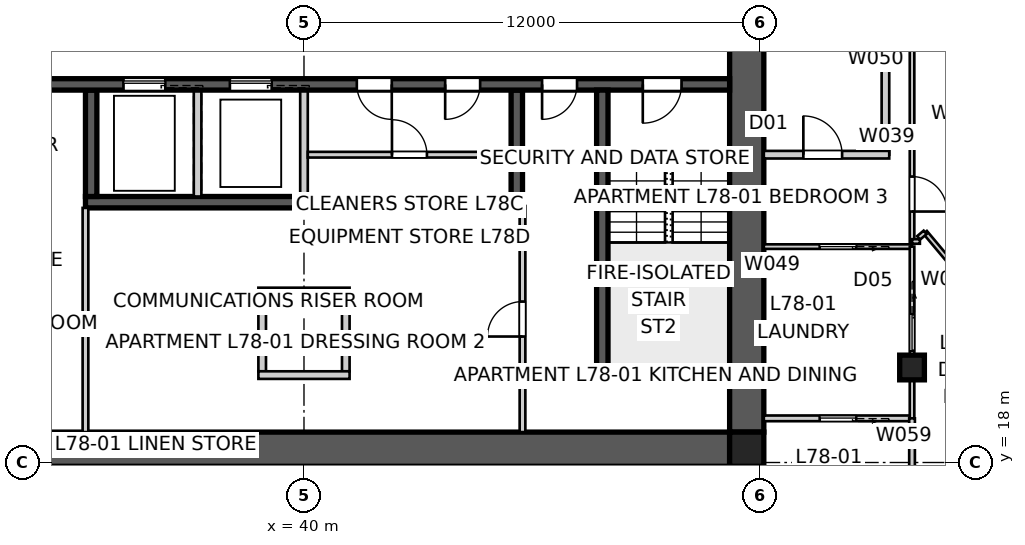
"""IFC4 building model, lengths in metres.
Left out: names, types, materials, properties, quantities, classifications, styles, units other than length and angle.
Written with IfcOpenShell. Run it as: python <this file> out.ifc"""

import sys

from ifc_helpers import new_model, si_unit, direction, frame, frame_2d, origin, origin_2d, place, context, subcontext, project, spatial, polyline, rectangle, outline, extrude, element, fill, save


model = new_model("IFC4")
c1 = context("Model", 3, precision=1e-05, world=origin(), true_north=direction((0.0, 1.0)))
c2 = subcontext(c1, "Body", "Model", "MODEL_VIEW")
j1 = project(units=[si_unit("LENGTHUNIT", "METRE"), si_unit("PLANEANGLEUNIT", "RADIAN")], contexts=[c1])
p1 = place(None, origin())
s1 = spatial("IfcSite", under=j1, at=p1, CompositionType="ELEMENT")
p2 = place(p1, origin())
s2 = spatial("IfcBuilding", under=s1, at=p2, CompositionType="ELEMENT")
p3 = place(p2, frame((0.0, 0.0, 282.8)))
s3 = spatial("IfcBuildingStorey", under=s2, at=p3, CompositionType="ELEMENT", Elevation=282.8)
p4 = place(p3, frame((51.2, 18.35, 0.0), z_axis=(0.0, 0.0, 1.0), x_axis=(-1.0, 0.0, 0.0)))
e1 = element("IfcWall", 1, at=p4, inside=s3, PredefinedType="SHEAR", context=c2, shape_type="SweptSolid", body=[
    extrude(outline(polyline([(0.0, -0.45), (22.4, -0.45), (22.4, -0.025), (22.85, -0.025), (22.85, 0.025), (22.4, 0.025), (22.4, 0.45), (0.0, 0.45), (0.0, 0.025), (-0.45, 0.025), (-0.45, -0.025), (0.0, -0.025), (0.0, -0.45)])), origin(), (0.0, 0.0, 1.0), 3.4),
])
p5 = place(p3, frame((51.65, 18.8, 0.0), z_axis=(0.0, 0.0, 1.0), x_axis=(0.0, 1.0, 0.0)))
e2 = element("IfcWall", 2, at=p5, inside=s3, PredefinedType="SHEAR", context=c2, shape_type="SweptSolid", body=[
    extrude(outline(polyline([(0.0, -0.45), (22.4, -0.45), (22.4, -0.025), (22.85, -0.025), (22.85, 0.025), (22.4, 0.025), (22.4, 0.45), (0.0, 0.45), (0.0, 0.025), (-0.45, 0.025), (-0.45, -0.025), (0.0, -0.025), (0.0, -0.45)])), origin(), (0.0, 0.0, 1.0), 3.4),
])
p6 = place(p5, frame((11.14, 0.0, 0.0)))
e3 = element("IfcOpeningElement", 3, at=p6, cuts=e2, PredefinedType="OPENING", context=c2, shape_type="SweptSolid", body=[
    extrude(rectangle(XDim=1.02, YDim=2.4, at=frame_2d((0.51, 1.2))), frame((0.0, 0.46, 0.0), z_axis=(0.0, -1.0, 0.0), x_axis=(1.0, 0.0, 0.0)), (0.0, 0.0, 1.0), 0.92),
])
p7 = place(p3, frame((51.2, 27.95, 0.0), z_axis=(0.0, 0.0, 1.0), x_axis=(-1.0, 0.0, 0.0)))
e4 = element("IfcWall", 4, at=p7, inside=s3, PredefinedType="SHEAR", context=c2, shape_type="SweptSolid", body=[
    extrude(rectangle(XDim=22.4, YDim=0.3, at=frame_2d((11.2, 0.0))), origin(), (0.0, 0.0, 1.0), 3.4),
])
p8 = place(p7, frame((19.04, 0.0, 0.0)))
e5 = element("IfcOpeningElement", 5, at=p8, cuts=e4, PredefinedType="OPENING", context=c2, shape_type="SweptSolid", body=[
    extrude(rectangle(XDim=0.92, YDim=2.1, at=frame_2d((0.46, 1.05))), frame((0.0, 0.16, 0.0), z_axis=(0.0, -1.0, 0.0), x_axis=(1.0, 0.0, 0.0)), (0.0, 0.0, 1.0), 0.32),
])
p9 = place(p7, frame((1.265, 0.0, 0.0)))
e6 = element("IfcOpeningElement", 6, at=p9, cuts=e4, PredefinedType="OPENING", context=c2, shape_type="SweptSolid", body=[
    extrude(rectangle(XDim=1.02, YDim=2.1, at=frame_2d((0.51, 1.05))), frame((0.0, 0.16, 0.0), z_axis=(0.0, -1.0, 0.0), x_axis=(1.0, 0.0, 0.0)), (0.0, 0.0, 1.0), 0.32),
])
p10 = place(p7, frame((4.015, 0.0, 0.0)))
e7 = element("IfcOpeningElement", 7, at=p10, cuts=e4, PredefinedType="OPENING", context=c2, shape_type="SweptSolid", body=[
    extrude(rectangle(XDim=0.92, YDim=2.1, at=frame_2d((0.46, 1.05))), frame((0.0, 0.16, 0.0), z_axis=(0.0, -1.0, 0.0), x_axis=(1.0, 0.0, 0.0)), (0.0, 0.0, 1.0), 0.32),
])
p11 = place(p7, frame((8.89, 0.0, 0.0)))
e8 = element("IfcOpeningElement", 8, at=p11, cuts=e4, PredefinedType="OPENING", context=c2, shape_type="SweptSolid", body=[
    extrude(rectangle(XDim=0.92, YDim=2.1, at=frame_2d((0.46, 1.05))), frame((0.0, 0.16, 0.0), z_axis=(0.0, -1.0, 0.0), x_axis=(1.0, 0.0, 0.0)), (0.0, 0.0, 1.0), 0.32),
])
p12 = place(p7, frame((6.565, 0.0, 0.0)))
e9 = element("IfcOpeningElement", 9, at=p12, cuts=e4, PredefinedType="OPENING", context=c2, shape_type="SweptSolid", body=[
    extrude(rectangle(XDim=0.92, YDim=2.1, at=frame_2d((0.46, 1.05))), frame((0.0, 0.16, 0.0), z_axis=(0.0, -1.0, 0.0), x_axis=(1.0, 0.0, 0.0)), (0.0, 0.0, 1.0), 0.32),
])
p13 = place(p7, frame((12.05, 0.0, 0.0)))
e10 = element("IfcOpeningElement", 10, at=p13, cuts=e4, PredefinedType="OPENING", context=c2, shape_type="SweptSolid", body=[
    extrude(rectangle(XDim=1.1, YDim=2.1, at=frame_2d((0.55, 1.05))), frame((0.0, 0.16, 0.0), z_axis=(0.0, -1.0, 0.0), x_axis=(1.0, 0.0, 0.0)), (0.0, 0.0, 1.0), 0.32),
])
p14 = place(p7, frame((14.85, 0.0, 0.0)))
e11 = element("IfcOpeningElement", 11, at=p14, cuts=e4, PredefinedType="OPENING", context=c2, shape_type="SweptSolid", body=[
    extrude(rectangle(XDim=1.1, YDim=2.1, at=frame_2d((0.55, 1.05))), frame((0.0, 0.16, 0.0), z_axis=(0.0, -1.0, 0.0), x_axis=(1.0, 0.0, 0.0)), (0.0, 0.0, 1.0), 0.32),
])
p15 = place(p3, frame((45.75, 24.85, 0.0), z_axis=(0.0, 0.0, 1.0), x_axis=(-1.0, 0.0, 0.0)))
e12 = element("IfcWall", 12, at=p15, inside=s3, PredefinedType="SHEAR", context=c2, shape_type="SweptSolid", body=[
    extrude(rectangle(XDim=11.5, YDim=0.3, at=frame_2d((5.75, 0.0))), origin(), (0.0, 0.0, 1.0), 3.4),
])
p16 = place(p3, frame((45.6, 27.8, 0.0), z_axis=(0.0, 0.0, 1.0), x_axis=(0.0, -1.0, 0.0)))
e13 = element("IfcWall", 13, at=p16, inside=s3, PredefinedType="SHEAR", context=c2, shape_type="SweptSolid", body=[
    extrude(rectangle(XDim=2.8, YDim=0.3, at=frame_2d((1.4, 0.0))), origin(), (0.0, 0.0, 1.0), 3.4),
])
for number, where, z_axis, x_axis in (
    (14, (40.0, 27.8, 0.0), (0.0, 0.0, 1.0), (0.0, -1.0, 0.0)),
    (15, (37.2, 27.8, 0.0), (0.0, 0.0, 1.0), (0.0, -1.0, 0.0)),
):
    element("IfcWall", number, at=place(p3, frame(where, z_axis=z_axis, x_axis=x_axis)), inside=s3, PredefinedType="SOLIDWALL", context=c2, shape_type="SweptSolid", body=[
        extrude(rectangle(XDim=2.8, YDim=0.2, at=frame_2d((1.4, 0.0))), origin(), (0.0, 0.0, 1.0), 3.4),
    ])
p17 = place(p3, frame((34.4, 27.8, 0.0), z_axis=(0.0, 0.0, 1.0), x_axis=(0.0, -1.0, 0.0)))
e16 = element("IfcWall", 16, at=p17, inside=s3, PredefinedType="SHEAR", context=c2, shape_type="SweptSolid", body=[
    extrude(rectangle(XDim=2.8, YDim=0.3, at=frame_2d((1.4, 0.0))), origin(), (0.0, 0.0, 1.0), 3.4),
])
p18 = place(p3, frame((47.85, 27.8, 0.0), z_axis=(0.0, 0.0, 1.0), x_axis=(0.0, -1.0, 0.0)))
e17 = element("IfcWall", 17, at=p18, inside=s3, PredefinedType="SHEAR", context=c2, shape_type="SweptSolid", body=[
    extrude(rectangle(XDim=7.7, YDim=0.3, at=frame_2d((3.85, 0.0))), origin(), (0.0, 0.0, 1.0), 3.4),
])
p19 = place(p3, frame((51.2, 20.25, 0.0), z_axis=(0.0, 0.0, 1.0), x_axis=(-1.0, 0.0, 0.0)))
e18 = element("IfcWall", 18, at=p19, inside=s3, PredefinedType="SHEAR", context=c2, shape_type="SweptSolid", body=[
    extrude(rectangle(XDim=3.5, YDim=0.3, at=frame_2d((1.75, 0.0))), origin(), (0.0, 0.0, 1.0), 3.4),
])
for number, where, z_axis, x_axis in (
    (19, (38.9, 22.4, 0.0), (0.0, 0.0, 1.0), (0.0, -1.0, 0.0)),
    (20, (41.1, 22.4, 0.0), (0.0, 0.0, 1.0), (0.0, -1.0, 0.0)),
):
    element("IfcWall", number, at=place(p3, frame(where, z_axis=z_axis, x_axis=x_axis)), inside=s3, PredefinedType="SOLIDWALL", context=c2, shape_type="SweptSolid", body=[
        extrude(rectangle(XDim=2.0, YDim=0.2, at=frame_2d((1.0, 0.0))), origin(), (0.0, 0.0, 1.0), 3.4),
    ])
for number, where, z_axis, x_axis in (
    (21, (38.8, 22.5, 0.0), (0.0, 0.0, 1.0), (1.0, 0.0, 0.0)),
    (22, (38.8, 20.3, 0.0), (0.0, 0.0, 1.0), (1.0, 0.0, 0.0)),
):
    element("IfcWall", number, at=place(p3, frame(where, z_axis=z_axis, x_axis=x_axis)), inside=s3, PredefinedType="SOLIDWALL", context=c2, shape_type="SweptSolid", body=[
        extrude(rectangle(XDim=2.4, YDim=0.2, at=frame_2d((1.2, 0.0))), origin(), (0.0, 0.0, 1.0), 3.4),
    ])
p20 = place(p3, frame((51.65, 18.35, 0.0), z_axis=(0.0, 0.0, 1.0), x_axis=(1.0, 0.0, 0.0)))
e23 = element("IfcColumn", 23, at=p20, inside=s3, PredefinedType="COLUMN", context=c2, shape_type="SweptSolid", body=[
    extrude(rectangle(XDim=0.9, YDim=0.9, at=origin_2d()), origin(), (0.0, 0.0, 1.0), 3.4),
])
p21 = place(p3, frame((56.0, 20.5, 0.0), z_axis=(0.0, 0.0, 1.0), x_axis=(1.0, 0.0, 0.0)))
e24 = element("IfcColumn", 24, at=p21, inside=s3, PredefinedType="COLUMN", context=c2, shape_type="SweptSolid", body=[
    extrude(rectangle(XDim=0.65, YDim=0.65, at=origin_2d()), origin(), (0.0, 0.0, 1.0), 3.4),
])
p22 = place(p3, frame((55.3, 26.1, 0.0), z_axis=(0.0, 0.0, 1.0), x_axis=(0.0, 1.0, 0.0)))
e25 = element("IfcWall", 25, at=p22, inside=s3, PredefinedType="PARTITIONING", context=c2, shape_type="SweptSolid", body=[
    extrude(rectangle(XDim=7.8, YDim=0.2, at=frame_2d((3.9, 0.0))), origin(), (0.0, 0.0, 1.0), 3.25),
])
p23 = place(p3, frame((52.1, 26.1, 0.0), z_axis=(0.0, 0.0, 1.0), x_axis=(1.0, 0.0, 0.0)))
e26 = element("IfcWall", 26, at=p23, inside=s3, PredefinedType="PARTITIONING", context=c2, shape_type="SweptSolid", body=[
    extrude(rectangle(XDim=3.3, YDim=0.2, at=frame_2d((1.65, 0.0))), origin(), (0.0, 0.0, 1.0), 3.25),
])
p24 = place(p23, frame((1.04, 0.0, 0.0)))
e27 = element("IfcOpeningElement", 27, at=p24, cuts=e26, PredefinedType="OPENING", context=c2, shape_type="SweptSolid", body=[
    extrude(rectangle(XDim=1.02, YDim=2.34, at=frame_2d((0.51, 1.17))), frame((0.0, 0.11, 0.0), z_axis=(0.0, -1.0, 0.0), x_axis=(1.0, 0.0, 0.0)), (0.0, 0.0, 1.0), 0.22),
])
p25 = place(p3, frame((45.75, 18.8, 0.0), z_axis=(0.0, 0.0, 1.0), x_axis=(0.0, 1.0, 0.0)))
e28 = element("IfcWall", 28, at=p25, inside=s3, PredefinedType="SOLIDWALL", context=c2, shape_type="SweptSolid", body=[
    extrude(rectangle(XDim=5.95, YDim=0.15, at=frame_2d((2.975, 0.0))), origin(), (0.0, 0.0, 1.0), 3.25),
])
p26 = place(p25, frame((2.515, 0.0, 0.0)))
e29 = element("IfcOpeningElement", 29, at=p26, cuts=e28, PredefinedType="OPENING", context=c2, shape_type="SweptSolid", body=[
    extrude(rectangle(XDim=0.92, YDim=2.1, at=frame_2d((0.46, 1.05))), frame((0.0, 0.085, 0.0), z_axis=(0.0, -1.0, 0.0), x_axis=(1.0, 0.0, 0.0)), (0.0, 0.0, 1.0), 0.17),
])
p27 = place(p3, frame((34.25, 18.8, 0.0), z_axis=(0.0, 0.0, 1.0), x_axis=(0.0, 1.0, 0.0)))
e30 = element("IfcWall", 30, at=p27, inside=s3, PredefinedType="SOLIDWALL", context=c2, shape_type="SweptSolid", body=[
    extrude(rectangle(XDim=5.9, YDim=0.15, at=frame_2d((2.95, 0.0))), origin(), (0.0, 0.0, 1.0), 3.25),
])
p28 = place(p3, frame((56.0, 23.681, 0.0), z_axis=(0.0, 0.0, 1.0), x_axis=(-1.0, 0.0, 0.0)))
e31 = element("IfcWall", 31, at=p28, inside=s3, PredefinedType="PARTITIONING", context=c2, shape_type="SweptSolid", body=[
    extrude(rectangle(XDim=3.9, YDim=0.12, at=frame_2d((1.95, 0.0))), origin(), (0.0, 0.0, 1.0), 3.25),
])
p29 = place(p28, frame((1.47, 0.0, 0.0)))
e32 = element("IfcOpeningElement", 32, at=p29, cuts=e31, PredefinedType="OPENING", context=c2, shape_type="SweptSolid", body=[
    extrude(rectangle(XDim=0.96, YDim=2.1, at=frame_2d((0.48, 1.05))), frame((0.0, 0.07, 0.0), z_axis=(0.0, -1.0, 0.0), x_axis=(1.0, 0.0, 0.0)), (0.0, 0.0, 1.0), 0.14),
])
p30 = place(p3, frame((56.0, 42.762, 0.0), z_axis=(0.0, 0.0, 1.0), x_axis=(0.0, -1.0, 0.0)))
e33 = element("IfcWall", 33, at=p30, inside=s3, PredefinedType="PARTITIONING", context=c2, shape_type="SweptSolid", body=[
    extrude(rectangle(XDim=18.995, YDim=0.12, at=frame_2d((9.498, 0.0))), origin(), (0.0, 0.0, 1.0), 2.549),
])
p31 = place(p30, frame((17.238, 0.0, 0.0)))
e34 = element("IfcOpeningElement", 34, at=p31, cuts=e33, PredefinedType="OPENING", context=c2, shape_type="SweptSolid", body=[
    extrude(rectangle(XDim=0.92, YDim=2.34, at=frame_2d((0.46, 1.17))), frame((0.0, 0.07, 0.0), z_axis=(0.0, -1.0, 0.0), x_axis=(1.0, 0.0, 0.0)), (0.0, 0.0, 1.0), 0.14),
])
p32 = place(p30, frame((6.017, 0.0, 0.0)))
e35 = element("IfcOpeningElement", 35, at=p32, cuts=e33, PredefinedType="OPENING", context=c2, shape_type="SweptSolid", body=[
    extrude(rectangle(XDim=0.92, YDim=2.34, at=frame_2d((0.46, 1.17))), frame((0.0, 0.07, 0.0), z_axis=(0.0, -1.0, 0.0), x_axis=(1.0, 0.0, 0.0)), (0.0, 0.0, 1.0), 0.14),
])
p33 = place(p3, frame((56.0, 19.162, 0.0), z_axis=(0.0, 0.0, 1.0), x_axis=(-1.0, 0.0, 0.0)))
e36 = element("IfcWall", 36, at=p33, inside=s3, PredefinedType="SOLIDWALL", context=c2, shape_type="SweptSolid", body=[
    extrude(rectangle(XDim=3.9, YDim=0.15, at=frame_2d((1.95, 0.0))), origin(), (0.0, 0.0, 1.0), 3.25),
])
p34 = place(p33, frame((1.47, 0.0, 0.0)))
e37 = element("IfcOpeningElement", 37, at=p34, cuts=e36, PredefinedType="OPENING", context=c2, shape_type="SweptSolid", body=[
    extrude(rectangle(XDim=0.96, YDim=2.1, at=frame_2d((0.48, 1.05))), frame((0.0, 0.085, 0.0), z_axis=(0.0, -1.0, 0.0), x_axis=(1.0, 0.0, 0.0)), (0.0, 0.0, 1.0), 0.17),
])
p35 = place(p3, frame((56.0, 23.681, 0.0), z_axis=(0.0, 0.0, 1.0), x_axis=(0.0, -1.0, 0.0)))
e38 = element("IfcWall", 38, at=p35, inside=s3, PredefinedType="PARTITIONING", context=c2, shape_type="SweptSolid", body=[
    extrude(rectangle(XDim=4.519, YDim=0.12, at=frame_2d((2.26, 0.0))), origin(), (0.0, 0.0, 1.0), 2.549),
])
p36 = place(p35, frame((1.78, 0.0, 0.0)))
e39 = element("IfcOpeningElement", 39, at=p36, cuts=e38, PredefinedType="OPENING", context=c2, shape_type="SweptSolid", body=[
    extrude(rectangle(XDim=0.96, YDim=2.1, at=frame_2d((0.48, 1.05))), frame((0.0, 0.07, 0.0), z_axis=(0.0, -1.0, 0.0), x_axis=(1.0, 0.0, 0.0)), (0.0, 0.0, 1.0), 0.14),
])
p37 = place(p3, frame((56.0, 19.162, 0.0), z_axis=(0.0, 0.0, 1.0), x_axis=(0.0, -1.0, 0.0)))
e40 = element("IfcWall", 40, at=p37, inside=s3, PredefinedType="SOLIDWALL", context=c2, shape_type="SweptSolid", body=[
    extrude(rectangle(XDim=2.445, YDim=0.15, at=frame_2d((1.222, 0.0))), origin(), (0.0, 0.0, 1.0), 3.25),
])
p38 = place(p3, frame((62.631, 22.281, 0.0), z_axis=(0.0, 0.0, 1.0), x_axis=(-0.64277851249, 0.766052076481, 0.0)))
e41 = element("IfcWall", 41, at=p38, inside=s3, PredefinedType="PARTITIONING", context=c2, shape_type="SweptSolid", body=[
    extrude(rectangle(XDim=10.316, YDim=0.12, at=frame_2d((5.158, 0.0))), origin(), (0.0, 0.0, 1.0), 3.25),
])
p39 = place(p38, frame((4.962, 0.0, 0.0)))
e42 = element("IfcOpeningElement", 42, at=p39, cuts=e41, PredefinedType="OPENING", context=c2, shape_type="SweptSolid", body=[
    extrude(rectangle(XDim=0.92, YDim=2.34, at=frame_2d((0.46, 1.17))), frame((0.0, 0.07, 0.0), z_axis=(0.0, -1.0, 0.0), x_axis=(1.0, 0.0, 0.0)), (0.0, 0.0, 1.0), 0.14),
])
p40 = place(p38, frame((1.525, 0.0, 0.0)))
e43 = element("IfcOpeningElement", 43, at=p40, cuts=e41, PredefinedType="OPENING", context=c2, shape_type="SweptSolid", body=[
    extrude(rectangle(XDim=0.92, YDim=2.34, at=frame_2d((0.46, 1.17))), frame((0.0, 0.07, 0.0), z_axis=(0.0, -1.0, 0.0), x_axis=(1.0, 0.0, 0.0)), (0.0, 0.0, 1.0), 0.14),
])
p41 = place(p3, frame((59.816, 19.919, 0.0), z_axis=(0.0, 0.0, 1.0), x_axis=(-0.642773197476, 0.766056536168, 0.0)))
e44 = element("IfcWall", 44, at=p41, inside=s3, PredefinedType="PARTITIONING", context=c2, shape_type="SweptSolid", body=[
    extrude(rectangle(XDim=5.4, YDim=0.12, at=frame_2d((2.7, 0.0))), origin(), (0.0, 0.0, 1.0), 3.25),
])
p42 = place(p3, frame((56.345, 24.056, 0.0), z_axis=(0.0, 0.0, 1.0), x_axis=(-0.766260492227, -0.642530044474, 0.0)))
e45 = element("IfcWall", 45, at=p42, inside=s3, PredefinedType="PARTITIONING", context=c2, shape_type="SweptSolid", body=[
    extrude(rectangle(XDim=0.225, YDim=0.12, at=frame_2d((0.112, 0.0))), origin(), (0.0, 0.0, 1.0), 3.25),
])
p43 = place(p3, frame((56.207, 23.817, 0.0), z_axis=(0.0, 0.0, 1.0), x_axis=(-1.0, 0.0, 0.0)))
e46 = element("IfcWall", 46, at=p43, inside=s3, PredefinedType="PARTITIONING", context=c2, shape_type="SweptSolid", body=[
    extrude(rectangle(XDim=0.207, YDim=0.12, at=frame_2d((0.104, 0.0))), origin(), (0.0, 0.0, 1.0), 3.25),
])
p44 = place(p3, frame((51.625, 17.9, 0.0), z_axis=(0.0, 0.0, 1.0), x_axis=(0.027925096799, 0.999610018442, 0.0)))
e47 = element("IfcWall", 47, at=p44, inside=s3, PredefinedType="SOLIDWALL", context=c2, shape_type="SweptSolid", body=[
    extrude(rectangle(XDim=0.9, YDim=0.15, at=frame_2d((0.45, 0.0))), origin(), (0.0, 0.0, 1.0), 3.25),
])
p45 = place(p3, frame((40.1, 26.1, 0.0), z_axis=(0.0, 0.0, 1.0), x_axis=(1.0, 0.0, 0.0)))
e48 = element("IfcWall", 48, at=p45, inside=s3, PredefinedType="SOLIDWALL", context=c2, shape_type="SweptSolid", body=[
    extrude(rectangle(XDim=5.35, YDim=0.15, at=frame_2d((2.675, 0.0))), origin(), (0.0, 0.0, 1.0), 3.25),
])
p46 = place(p45, frame((2.215, 0.0, 0.0)))
e49 = element("IfcOpeningElement", 49, at=p46, cuts=e48, PredefinedType="OPENING", context=c2, shape_type="SweptSolid", body=[
    extrude(rectangle(XDim=0.92, YDim=2.1, at=frame_2d((0.46, 1.05))), frame((0.0, 0.085, 0.0), z_axis=(0.0, -1.0, 0.0), x_axis=(1.0, 0.0, 0.0)), (0.0, 0.0, 1.0), 0.17),
])
p47 = place(p9, origin())
e50 = element("IfcDoor", 50, at=p47, inside=s3, OperationType="SINGLE_SWING_RIGHT", PredefinedType="DOOR", context=c2, shape_type="SweptSolid", body=[
    extrude(rectangle(XDim=1.02, YDim=2.1, at=frame_2d((0.51, 1.05))), frame((0.0, 0.025, 0.0), z_axis=(0.0, -1.0, 0.0), x_axis=(1.0, 0.0, 0.0)), (0.0, 0.0, 1.0), 0.05),
])
fill(e6, e50)
p48 = place(p10, origin())
e51 = element("IfcDoor", 51, at=p48, inside=s3, OperationType="SINGLE_SWING_RIGHT", PredefinedType="DOOR", context=c2, shape_type="SweptSolid", body=[
    extrude(rectangle(XDim=0.92, YDim=2.1, at=frame_2d((0.46, 1.05))), frame((0.0, 0.025, 0.0), z_axis=(0.0, -1.0, 0.0), x_axis=(1.0, 0.0, 0.0)), (0.0, 0.0, 1.0), 0.05),
])
fill(e7, e51)
p49 = place(p24, origin())
e52 = element("IfcDoor", 52, at=p49, inside=s3, OperationType="SINGLE_SWING_LEFT", PredefinedType="DOOR", context=c2, shape_type="SweptSolid", body=[
    extrude(rectangle(XDim=1.02, YDim=2.34, at=frame_2d((0.51, 1.17))), frame((0.0, 0.025, 0.0), z_axis=(0.0, -1.0, 0.0), x_axis=(1.0, 0.0, 0.0)), (0.0, 0.0, 1.0), 0.05),
])
fill(e27, e52)
p50 = place(p26, origin())
e53 = element("IfcDoor", 53, at=p50, inside=s3, OperationType="SINGLE_SWING_LEFT", PredefinedType="DOOR", context=c2, shape_type="SweptSolid", body=[
    extrude(rectangle(XDim=0.92, YDim=2.1, at=frame_2d((0.46, 1.05))), frame((0.0, 0.025, 0.0), z_axis=(0.0, -1.0, 0.0), x_axis=(1.0, 0.0, 0.0)), (0.0, 0.0, 1.0), 0.05),
])
fill(e29, e53)
p51 = place(p31, origin())
e54 = element("IfcDoor", 54, at=p51, inside=s3, OperationType="SINGLE_SWING_RIGHT", PredefinedType="DOOR", context=c2, shape_type="SweptSolid", body=[
    extrude(rectangle(XDim=0.92, YDim=2.34, at=frame_2d((0.46, 1.17))), frame((0.0, 0.025, 0.0), z_axis=(0.0, -1.0, 0.0), x_axis=(1.0, 0.0, 0.0)), (0.0, 0.0, 1.0), 0.05),
])
fill(e34, e54)
p52 = place(p29, origin())
e55 = element("IfcDoor", 55, at=p52, inside=s3, OperationType="SLIDING_TO_LEFT", PredefinedType="DOOR", context=c2, shape_type="SweptSolid", body=[
    extrude(rectangle(XDim=0.96, YDim=2.1, at=frame_2d((0.48, 1.05))), frame((0.0, 0.025, 0.0), z_axis=(0.0, -1.0, 0.0), x_axis=(1.0, 0.0, 0.0)), (0.0, 0.0, 1.0), 0.05),
])
fill(e32, e55)
p53 = place(p36, origin())
e56 = element("IfcDoor", 56, at=p53, inside=s3, OperationType="SLIDING_TO_LEFT", PredefinedType="DOOR", context=c2, shape_type="SweptSolid", body=[
    extrude(rectangle(XDim=0.96, YDim=2.1, at=frame_2d((0.48, 1.05))), frame((0.0, 0.025, 0.0), z_axis=(0.0, -1.0, 0.0), x_axis=(1.0, 0.0, 0.0)), (0.0, 0.0, 1.0), 0.05),
])
fill(e39, e56)
p54 = place(p34, origin())
e57 = element("IfcDoor", 57, at=p54, inside=s3, OperationType="SLIDING_TO_LEFT", PredefinedType="DOOR", context=c2, shape_type="SweptSolid", body=[
    extrude(rectangle(XDim=0.96, YDim=2.1, at=frame_2d((0.48, 1.05))), frame((0.0, 0.025, 0.0), z_axis=(0.0, -1.0, 0.0), x_axis=(1.0, 0.0, 0.0)), (0.0, 0.0, 1.0), 0.05),
])
fill(e37, e57)
p55 = place(p11, origin())
e58 = element("IfcDoor", 58, at=p55, inside=s3, OperationType="SINGLE_SWING_LEFT", PredefinedType="DOOR", context=c2, shape_type="SweptSolid", body=[
    extrude(rectangle(XDim=0.92, YDim=2.1, at=frame_2d((0.46, 1.05))), frame((0.0, 0.025, 0.0), z_axis=(0.0, -1.0, 0.0), x_axis=(1.0, 0.0, 0.0)), (0.0, 0.0, 1.0), 0.05),
])
fill(e8, e58)
p56 = place(p12, origin())
e59 = element("IfcDoor", 59, at=p56, inside=s3, OperationType="SINGLE_SWING_RIGHT", PredefinedType="DOOR", context=c2, shape_type="SweptSolid", body=[
    extrude(rectangle(XDim=0.92, YDim=2.1, at=frame_2d((0.46, 1.05))), frame((0.0, 0.025, 0.0), z_axis=(0.0, -1.0, 0.0), x_axis=(1.0, 0.0, 0.0)), (0.0, 0.0, 1.0), 0.05),
])
fill(e9, e59)
p57 = place(p46, origin())
e60 = element("IfcDoor", 60, at=p57, inside=s3, OperationType="SINGLE_SWING_LEFT", PredefinedType="DOOR", context=c2, shape_type="SweptSolid", body=[
    extrude(rectangle(XDim=0.92, YDim=2.1, at=frame_2d((0.46, 1.05))), frame((0.0, 0.025, 0.0), z_axis=(0.0, -1.0, 0.0), x_axis=(1.0, 0.0, 0.0)), (0.0, 0.0, 1.0), 0.05),
])
fill(e49, e60)
p58 = place(p13, origin())
e61 = element("IfcDoor", 61, at=p58, inside=s3, OperationType="SLIDING_TO_LEFT", PredefinedType="DOOR", context=c2, shape_type="SweptSolid", body=[
    extrude(rectangle(XDim=1.1, YDim=2.1, at=frame_2d((0.55, 1.05))), frame((0.0, 0.025, 0.0), z_axis=(0.0, -1.0, 0.0), x_axis=(1.0, 0.0, 0.0)), (0.0, 0.0, 1.0), 0.05),
])
fill(e10, e61)
p59 = place(p14, origin())
e62 = element("IfcDoor", 62, at=p59, inside=s3, OperationType="SLIDING_TO_LEFT", PredefinedType="DOOR", context=c2, shape_type="SweptSolid", body=[
    extrude(rectangle(XDim=1.1, YDim=2.1, at=frame_2d((0.55, 1.05))), frame((0.0, 0.025, 0.0), z_axis=(0.0, -1.0, 0.0), x_axis=(1.0, 0.0, 0.0)), (0.0, 0.0, 1.0), 0.05),
])
fill(e11, e62)
save(model, sys.argv[1])
